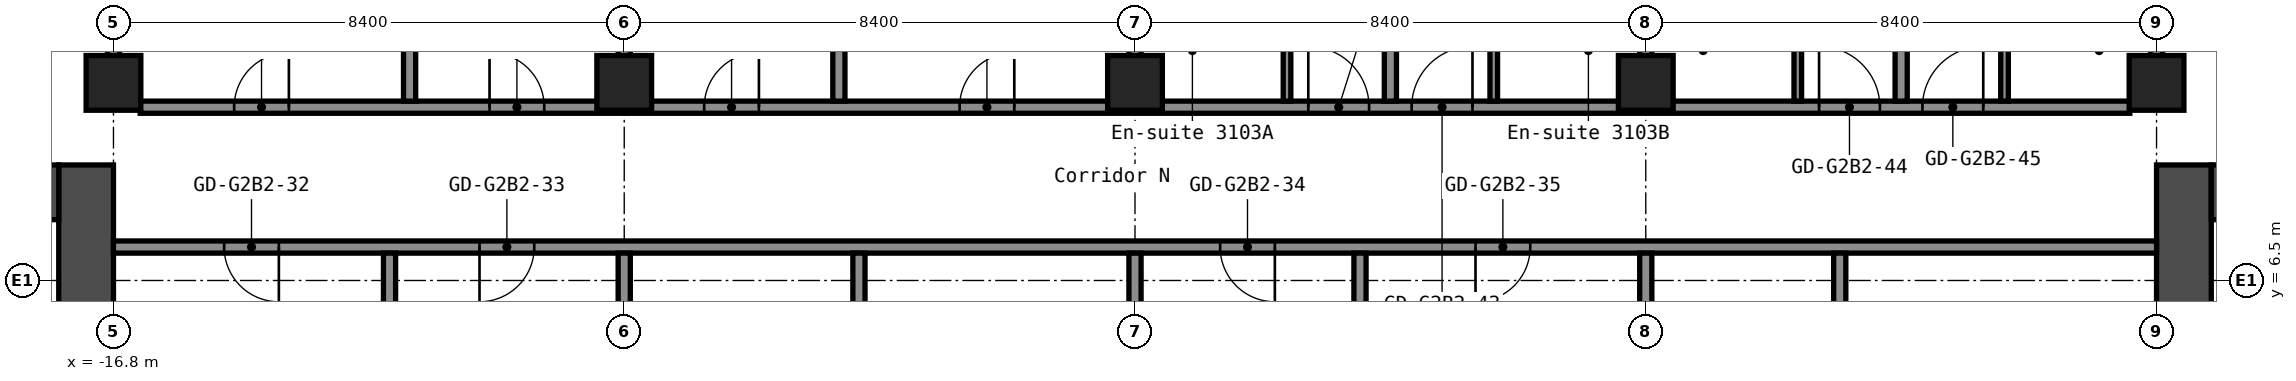
"""IFC4 building model, lengths in metres.
Left out: names, types, materials, properties, quantities, classifications, styles, units other than length and angle.
Written with IfcOpenShell. Run it as: python <this file> out.ifc"""

import sys

from ifc_helpers import new_model, si_unit, direction, frame, frame_2d, origin, origin_2d, place, context, subcontext, project, spatial, rectangle, hollow_rectangle, extrude, element, fill, save


model = new_model("IFC4")
c1 = context("Model", 3, precision=1e-05, world=origin(), true_north=direction((0.0, 1.0)))
c2 = subcontext(c1, "Body", "Model", "MODEL_VIEW")
j1 = project(units=[si_unit("LENGTHUNIT", "METRE"), si_unit("PLANEANGLEUNIT", "RADIAN")], contexts=[c1])
p1 = place(None, origin())
s1 = spatial("IfcSite", under=j1, at=p1, CompositionType="ELEMENT")
p2 = place(p1, origin())
s2 = spatial("IfcBuilding", under=s1, at=p2, CompositionType="ELEMENT")
p3 = place(p2, frame((0.0, 0.0, 110.6)))
s3 = spatial("IfcBuildingStorey", under=s2, at=p3, CompositionType="ELEMENT", Elevation=110.6)
for number, where, z_axis, x_axis in (
    (1, (-16.8, 9.75, 0.0), (0.0, 0.0, 1.0), (1.0, 0.0, 0.0)),
    (2, (-8.4, 9.75, 0.0), (0.0, 0.0, 1.0), (1.0, 0.0, 0.0)),
    (3, (0.0, 9.75, 0.0), (0.0, 0.0, 1.0), (1.0, 0.0, 0.0)),
    (4, (8.4, 9.75, 0.0), (0.0, 0.0, 1.0), (1.0, 0.0, 0.0)),
    (5, (16.8, 9.75, 0.0), (0.0, 0.0, 1.0), (1.0, 0.0, 0.0)),
):
    element("IfcColumn", number, at=place(p3, frame(where, z_axis=z_axis, x_axis=x_axis)), inside=s3, PredefinedType="COLUMN", context=c2, shape_type="SweptSolid", body=[
        extrude(hollow_rectangle(XDim=0.9, YDim=0.9, WallThickness=0.036, at=origin_2d()), origin(), (0.0, 0.0, 1.0), 2.8),
    ])
p4 = place(p3, frame((-17.25, -8.4, 0.0), z_axis=(0.0, 0.0, 1.0), x_axis=(0.0, 1.0, 0.0)))
e6 = element("IfcWall", 6, at=p4, inside=s3, PredefinedType="SHEAR", context=c2, shape_type="SweptSolid", body=[
    extrude(rectangle(XDim=16.8, YDim=0.9, at=frame_2d((8.4, 0.0))), origin(), (0.0, 0.0, 1.0), 2.8),
])
p5 = place(p4, frame((7.6, 0.0, 0.0)))
e7 = element("IfcOpeningElement", 7, at=p5, cuts=e6, PredefinedType="OPENING", context=c2, shape_type="SweptSolid", body=[
    extrude(rectangle(XDim=1.2, YDim=2.1, at=frame_2d((0.6, 1.05))), frame((0.0, 0.46, 0.0), z_axis=(0.0, -1.0, 0.0), x_axis=(1.0, 0.0, 0.0)), (0.0, 0.0, 1.0), 0.92),
])
p6 = place(p3, frame((-32.7, 7.95, 0.0), z_axis=(0.0, 0.0, 1.0), x_axis=(1.0, 0.0, 0.0)))
e8 = element("IfcWall", 8, at=p6, inside=s3, PredefinedType="SHEAR", context=c2, shape_type="SweptSolid", body=[
    extrude(rectangle(XDim=15.0, YDim=0.9, at=frame_2d((7.5, 0.0))), origin(), (0.0, 0.0, 1.0), 2.8),
])
p7 = place(p6, frame((3.4, 0.0, 0.0)))
e9 = element("IfcOpeningElement", 9, at=p7, cuts=e8, PredefinedType="OPENING", context=c2, shape_type="SweptSolid", body=[
    extrude(rectangle(XDim=1.2, YDim=2.1, at=frame_2d((0.6, 1.05))), frame((0.0, 0.46, 0.0), z_axis=(0.0, -1.0, 0.0), x_axis=(1.0, 0.0, 0.0)), (0.0, 0.0, 1.0), 0.92),
])
p8 = place(p6, frame((0.75, 0.0, 0.0)))
e10 = element("IfcOpeningElement", 10, at=p8, cuts=e8, PredefinedType="OPENING", context=c2, shape_type="SweptSolid", body=[
    extrude(rectangle(XDim=0.9, YDim=2.1, at=frame_2d((0.45, 1.05))), frame((0.0, 0.46, 0.0), z_axis=(0.0, -1.0, 0.0), x_axis=(1.0, 0.0, 0.0)), (0.0, 0.0, 1.0), 0.92),
])
p9 = place(p3, frame((17.25, -8.4, 0.0), z_axis=(0.0, 0.0, 1.0), x_axis=(0.0, 1.0, 0.0)))
e11 = element("IfcWall", 11, at=p9, inside=s3, PredefinedType="SHEAR", context=c2, shape_type="SweptSolid", body=[
    extrude(rectangle(XDim=16.8, YDim=0.9, at=frame_2d((8.4, 0.0))), origin(), (0.0, 0.0, 1.0), 2.8),
])
p10 = place(p9, frame((7.6, 0.0, 0.0)))
e12 = element("IfcOpeningElement", 12, at=p10, cuts=e11, PredefinedType="OPENING", context=c2, shape_type="SweptSolid", body=[
    extrude(rectangle(XDim=1.2, YDim=2.1, at=frame_2d((0.6, 1.05))), frame((0.0, 0.46, 0.0), z_axis=(0.0, -1.0, 0.0), x_axis=(1.0, 0.0, 0.0)), (0.0, 0.0, 1.0), 0.92),
])
p11 = place(p3, frame((17.7, 7.95, 0.0), z_axis=(0.0, 0.0, 1.0), x_axis=(1.0, 0.0, 0.0)))
e13 = element("IfcWall", 13, at=p11, inside=s3, PredefinedType="SHEAR", context=c2, shape_type="SweptSolid", body=[
    extrude(rectangle(XDim=15.0, YDim=0.9, at=frame_2d((7.5, 0.0))), origin(), (0.0, 0.0, 1.0), 2.8),
])
p12 = place(p11, frame((10.4, 0.0, 0.0)))
e14 = element("IfcOpeningElement", 14, at=p12, cuts=e13, PredefinedType="OPENING", context=c2, shape_type="SweptSolid", body=[
    extrude(rectangle(XDim=1.2, YDim=2.1, at=frame_2d((0.6, 1.05))), frame((0.0, 0.46, 0.0), z_axis=(0.0, -1.0, 0.0), x_axis=(1.0, 0.0, 0.0)), (0.0, 0.0, 1.0), 0.92),
])
p13 = place(p11, frame((13.35, 0.0, 0.0)))
e15 = element("IfcOpeningElement", 15, at=p13, cuts=e13, PredefinedType="OPENING", context=c2, shape_type="SweptSolid", body=[
    extrude(rectangle(XDim=0.9, YDim=2.1, at=frame_2d((0.45, 1.05))), frame((0.0, 0.46, 0.0), z_axis=(0.0, -1.0, 0.0), x_axis=(1.0, 0.0, 0.0)), (0.0, 0.0, 1.0), 0.92),
])
p14 = place(p3, frame((-16.8, 7.05, 0.0), z_axis=(0.0, 0.0, 1.0), x_axis=(1.0, 0.0, 0.0)))
e16 = element("IfcWall", 16, at=p14, inside=s3, PredefinedType="PARTITIONING", context=c2, shape_type="SweptSolid", body=[
    extrude(rectangle(XDim=33.6, YDim=0.2, at=frame_2d((16.8, 0.0))), origin(), (0.0, 0.0, 1.0), 2.8),
])
p15 = place(p14, frame((1.82, 0.0, 0.0)))
e17 = element("IfcOpeningElement", 17, at=p15, cuts=e16, PredefinedType="OPENING", context=c2, shape_type="SweptSolid", body=[
    extrude(rectangle(XDim=0.9, YDim=2.1, at=frame_2d((0.45, 1.05))), frame((0.0, 0.11, 0.0), z_axis=(0.0, -1.0, 0.0), x_axis=(1.0, 0.0, 0.0)), (0.0, 0.0, 1.0), 0.22),
])
p16 = place(p14, frame((6.02, 0.0, 0.0)))
e18 = element("IfcOpeningElement", 18, at=p16, cuts=e16, PredefinedType="OPENING", context=c2, shape_type="SweptSolid", body=[
    extrude(rectangle(XDim=0.9, YDim=2.1, at=frame_2d((0.45, 1.05))), frame((0.0, 0.11, 0.0), z_axis=(0.0, -1.0, 0.0), x_axis=(1.0, 0.0, 0.0)), (0.0, 0.0, 1.0), 0.22),
])
p17 = place(p14, frame((18.2, 0.0, 0.0)))
e19 = element("IfcOpeningElement", 19, at=p17, cuts=e16, PredefinedType="OPENING", context=c2, shape_type="SweptSolid", body=[
    extrude(rectangle(XDim=0.9, YDim=2.1, at=frame_2d((0.45, 1.05))), frame((0.0, 0.11, 0.0), z_axis=(0.0, -1.0, 0.0), x_axis=(1.0, 0.0, 0.0)), (0.0, 0.0, 1.0), 0.22),
])
p18 = place(p14, frame((22.4, 0.0, 0.0)))
e20 = element("IfcOpeningElement", 20, at=p18, cuts=e16, PredefinedType="OPENING", context=c2, shape_type="SweptSolid", body=[
    extrude(rectangle(XDim=0.9, YDim=2.1, at=frame_2d((0.45, 1.05))), frame((0.0, 0.11, 0.0), z_axis=(0.0, -1.0, 0.0), x_axis=(1.0, 0.0, 0.0)), (0.0, 0.0, 1.0), 0.22),
])
p19 = place(p3, frame((-16.36, 9.35, 0.0), z_axis=(0.0, 0.0, 1.0), x_axis=(1.0, 0.0, 0.0)))
e21 = element("IfcWall", 21, at=p19, inside=s3, PredefinedType="PARTITIONING", context=c2, shape_type="SweptSolid", body=[
    extrude(rectangle(XDim=32.72, YDim=0.2, at=frame_2d((16.36, 0.0))), origin(), (0.0, 0.0, 1.0), 2.8),
])
p20 = place(p19, frame((1.545, 0.0, 0.0)))
e22 = element("IfcOpeningElement", 22, at=p20, cuts=e21, PredefinedType="OPENING", context=c2, shape_type="SweptSolid", body=[
    extrude(rectangle(XDim=0.9, YDim=2.1, at=frame_2d((0.45, 1.05))), frame((0.0, 0.11, 0.0), z_axis=(0.0, -1.0, 0.0), x_axis=(1.0, 0.0, 0.0)), (0.0, 0.0, 1.0), 0.22),
])
p21 = place(p19, frame((5.745, 0.0, 0.0)))
e23 = element("IfcOpeningElement", 23, at=p21, cuts=e21, PredefinedType="OPENING", context=c2, shape_type="SweptSolid", body=[
    extrude(rectangle(XDim=0.9, YDim=2.1, at=frame_2d((0.45, 1.05))), frame((0.0, 0.11, 0.0), z_axis=(0.0, -1.0, 0.0), x_axis=(1.0, 0.0, 0.0)), (0.0, 0.0, 1.0), 0.22),
])
p22 = place(p19, frame((9.275, 0.0, 0.0)))
e24 = element("IfcOpeningElement", 24, at=p22, cuts=e21, PredefinedType="OPENING", context=c2, shape_type="SweptSolid", body=[
    extrude(rectangle(XDim=0.9, YDim=2.1, at=frame_2d((0.45, 1.05))), frame((0.0, 0.11, 0.0), z_axis=(0.0, -1.0, 0.0), x_axis=(1.0, 0.0, 0.0)), (0.0, 0.0, 1.0), 0.22),
])
p23 = place(p19, frame((13.475, 0.0, 0.0)))
e25 = element("IfcOpeningElement", 25, at=p23, cuts=e21, PredefinedType="OPENING", context=c2, shape_type="SweptSolid", body=[
    extrude(rectangle(XDim=0.9, YDim=2.1, at=frame_2d((0.45, 1.05))), frame((0.0, 0.11, 0.0), z_axis=(0.0, -1.0, 0.0), x_axis=(1.0, 0.0, 0.0)), (0.0, 0.0, 1.0), 0.22),
])
p24 = place(p19, frame((19.21, 0.0, 0.0)))
e26 = element("IfcOpeningElement", 26, at=p24, cuts=e21, PredefinedType="OPENING", context=c2, shape_type="SweptSolid", body=[
    extrude(rectangle(XDim=1.0, YDim=2.1, at=frame_2d((0.5, 1.05))), frame((0.0, 0.11, 0.0), z_axis=(0.0, -1.0, 0.0), x_axis=(1.0, 0.0, 0.0)), (0.0, 0.0, 1.0), 0.22),
])
p25 = place(p19, frame((20.91, 0.0, 0.0)))
e27 = element("IfcOpeningElement", 27, at=p25, cuts=e21, PredefinedType="OPENING", context=c2, shape_type="SweptSolid", body=[
    extrude(rectangle(XDim=1.0, YDim=2.1, at=frame_2d((0.5, 1.05))), frame((0.0, 0.11, 0.0), z_axis=(0.0, -1.0, 0.0), x_axis=(1.0, 0.0, 0.0)), (0.0, 0.0, 1.0), 0.22),
])
p26 = place(p19, frame((27.61, 0.0, 0.0)))
e28 = element("IfcOpeningElement", 28, at=p26, cuts=e21, PredefinedType="OPENING", context=c2, shape_type="SweptSolid", body=[
    extrude(rectangle(XDim=1.0, YDim=2.1, at=frame_2d((0.5, 1.05))), frame((0.0, 0.11, 0.0), z_axis=(0.0, -1.0, 0.0), x_axis=(1.0, 0.0, 0.0)), (0.0, 0.0, 1.0), 0.22),
])
p27 = place(p19, frame((29.31, 0.0, 0.0)))
e29 = element("IfcOpeningElement", 29, at=p27, cuts=e21, PredefinedType="OPENING", context=c2, shape_type="SweptSolid", body=[
    extrude(rectangle(XDim=1.0, YDim=2.1, at=frame_2d((0.5, 1.05))), frame((0.0, 0.11, 0.0), z_axis=(0.0, -1.0, 0.0), x_axis=(1.0, 0.0, 0.0)), (0.0, 0.0, 1.0), 0.22),
])
p28 = place(p3, frame((-16.8, 10.19, 0.0), z_axis=(0.0, 0.0, 1.0), x_axis=(0.0, 1.0, 0.0)))
e30 = element("IfcWall", 30, at=p28, inside=s3, PredefinedType="PARTITIONING", context=c2, shape_type="SweptSolid", body=[
    extrude(rectangle(XDim=13.36, YDim=0.2, at=frame_2d((6.68, 0.0))), origin(), (0.0, 0.0, 1.0), 2.8),
])
p29 = place(p3, frame((-12.26, 1.05, 0.0), z_axis=(0.0, 0.0, 1.0), x_axis=(0.0, 1.0, 0.0)))
e31 = element("IfcWall", 31, at=p29, inside=s3, PredefinedType="PARTITIONING", context=c2, shape_type="SweptSolid", body=[
    extrude(rectangle(XDim=5.9, YDim=0.2, at=frame_2d((2.95, 0.0))), origin(), (0.0, 0.0, 1.0), 2.8),
])
p30 = place(p3, frame((-11.93, 9.45, 0.0), z_axis=(0.0, 0.0, 1.0), x_axis=(0.0, 1.0, 0.0)))
e32 = element("IfcWall", 32, at=p30, inside=s3, PredefinedType="PARTITIONING", context=c2, shape_type="SweptSolid", body=[
    extrude(rectangle(XDim=14.1, YDim=0.2, at=frame_2d((7.05, 0.0))), origin(), (0.0, 0.0, 1.0), 2.8),
])
p31 = place(p3, frame((-8.4, 1.05, 0.0), z_axis=(0.0, 0.0, 1.0), x_axis=(0.0, 1.0, 0.0)))
e33 = element("IfcWall", 33, at=p31, inside=s3, PredefinedType="PARTITIONING", context=c2, shape_type="SweptSolid", body=[
    extrude(rectangle(XDim=5.9, YDim=0.2, at=frame_2d((2.95, 0.0))), origin(), (0.0, 0.0, 1.0), 2.8),
])
p32 = place(p3, frame((-8.4, 10.19, 0.0), z_axis=(0.0, 0.0, 1.0), x_axis=(0.0, 1.0, 0.0)))
e34 = element("IfcWall", 34, at=p32, inside=s3, PredefinedType="PARTITIONING", context=c2, shape_type="SweptSolid", body=[
    extrude(rectangle(XDim=13.36, YDim=0.2, at=frame_2d((6.68, 0.0))), origin(), (0.0, 0.0, 1.0), 2.8),
])
p33 = place(p3, frame((-4.87, 9.45, 0.0), z_axis=(0.0, 0.0, 1.0), x_axis=(0.0, 1.0, 0.0)))
e35 = element("IfcWall", 35, at=p33, inside=s3, PredefinedType="PARTITIONING", context=c2, shape_type="SweptSolid", body=[
    extrude(rectangle(XDim=14.1, YDim=0.2, at=frame_2d((7.05, 0.0))), origin(), (0.0, 0.0, 1.0), 2.8),
])
for number, where, z_axis, x_axis in (
    (36, (-4.54, 1.05, 0.0), (0.0, 0.0, 1.0), (0.0, 1.0, 0.0)),
    (37, (0.0, 1.05, 0.0), (0.0, 0.0, 1.0), (0.0, 1.0, 0.0)),
):
    element("IfcWall", number, at=place(p3, frame(where, z_axis=z_axis, x_axis=x_axis)), inside=s3, PredefinedType="PARTITIONING", context=c2, shape_type="SweptSolid", body=[
        extrude(rectangle(XDim=5.9, YDim=0.2, at=frame_2d((2.95, 0.0))), origin(), (0.0, 0.0, 1.0), 2.8),
    ])
p34 = place(p3, frame((0.0, 10.19, 0.0), z_axis=(0.0, 0.0, 1.0), x_axis=(0.0, 1.0, 0.0)))
e38 = element("IfcWall", 38, at=p34, inside=s3, PredefinedType="PARTITIONING", context=c2, shape_type="SweptSolid", body=[
    extrude(rectangle(XDim=13.36, YDim=0.2, at=frame_2d((6.68, 0.0))), origin(), (0.0, 0.0, 1.0), 2.8),
])
p35 = place(p3, frame((2.5, 9.45, 0.0), z_axis=(0.0, 0.0, 1.0), x_axis=(0.0, 1.0, 0.0)))
e39 = element("IfcWall", 39, at=p35, inside=s3, PredefinedType="PARTITIONING", context=c2, shape_type="SweptSolid", body=[
    extrude(rectangle(XDim=2.9, YDim=0.125, at=frame_2d((1.45, 0.0))), origin(), (0.0, 0.0, 1.0), 2.8),
])
p36 = place(p35, frame((1.5, 0.0, 0.0)))
e40 = element("IfcOpeningElement", 40, at=p36, cuts=e39, PredefinedType="OPENING", context=c2, shape_type="SweptSolid", body=[
    extrude(rectangle(XDim=0.8, YDim=2.1, at=frame_2d((0.4, 1.05))), frame((0.0, 0.073, 0.0), z_axis=(0.0, -1.0, 0.0), x_axis=(1.0, 0.0, 0.0)), (0.0, 0.0, 1.0), 0.145),
])
p37 = place(p3, frame((3.7, 1.05, 0.0), z_axis=(0.0, 0.0, 1.0), x_axis=(0.0, 1.0, 0.0)))
e41 = element("IfcWall", 41, at=p37, inside=s3, PredefinedType="PARTITIONING", context=c2, shape_type="SweptSolid", body=[
    extrude(rectangle(XDim=5.9, YDim=0.2, at=frame_2d((2.95, 0.0))), origin(), (0.0, 0.0, 1.0), 2.8),
])
p38 = place(p3, frame((4.2, 9.45, 0.0), z_axis=(0.0, 0.0, 1.0), x_axis=(0.0, 1.0, 0.0)))
e42 = element("IfcWall", 42, at=p38, inside=s3, PredefinedType="PARTITIONING", context=c2, shape_type="SweptSolid", body=[
    extrude(rectangle(XDim=14.1, YDim=0.2, at=frame_2d((7.05, 0.0))), origin(), (0.0, 0.0, 1.0), 2.8),
])
p39 = place(p3, frame((5.9, 9.45, 0.0), z_axis=(0.0, 0.0, 1.0), x_axis=(0.0, 1.0, 0.0)))
e43 = element("IfcWall", 43, at=p39, inside=s3, PredefinedType="PARTITIONING", context=c2, shape_type="SweptSolid", body=[
    extrude(rectangle(XDim=2.9, YDim=0.125, at=frame_2d((1.45, 0.0))), origin(), (0.0, 0.0, 1.0), 2.8),
])
p40 = place(p39, frame((1.5, 0.0, 0.0)))
e44 = element("IfcOpeningElement", 44, at=p40, cuts=e43, PredefinedType="OPENING", context=c2, shape_type="SweptSolid", body=[
    extrude(rectangle(XDim=0.8, YDim=2.1, at=frame_2d((0.4, 1.05))), frame((0.0, 0.073, 0.0), z_axis=(0.0, -1.0, 0.0), x_axis=(1.0, 0.0, 0.0)), (0.0, 0.0, 1.0), 0.145),
])
p41 = place(p3, frame((8.4, 1.05, 0.0), z_axis=(0.0, 0.0, 1.0), x_axis=(0.0, 1.0, 0.0)))
e45 = element("IfcWall", 45, at=p41, inside=s3, PredefinedType="PARTITIONING", context=c2, shape_type="SweptSolid", body=[
    extrude(rectangle(XDim=5.9, YDim=0.2, at=frame_2d((2.95, 0.0))), origin(), (0.0, 0.0, 1.0), 2.8),
])
p42 = place(p3, frame((8.4, 10.19, 0.0), z_axis=(0.0, 0.0, 1.0), x_axis=(0.0, 1.0, 0.0)))
e46 = element("IfcWall", 46, at=p42, inside=s3, PredefinedType="PARTITIONING", context=c2, shape_type="SweptSolid", body=[
    extrude(rectangle(XDim=13.36, YDim=0.2, at=frame_2d((6.68, 0.0))), origin(), (0.0, 0.0, 1.0), 2.8),
])
p43 = place(p3, frame((10.9, 9.45, 0.0), z_axis=(0.0, 0.0, 1.0), x_axis=(0.0, 1.0, 0.0)))
e47 = element("IfcWall", 47, at=p43, inside=s3, PredefinedType="PARTITIONING", context=c2, shape_type="SweptSolid", body=[
    extrude(rectangle(XDim=2.9, YDim=0.125, at=frame_2d((1.45, 0.0))), origin(), (0.0, 0.0, 1.0), 2.8),
])
p44 = place(p43, frame((1.5, 0.0, 0.0)))
e48 = element("IfcOpeningElement", 48, at=p44, cuts=e47, PredefinedType="OPENING", context=c2, shape_type="SweptSolid", body=[
    extrude(rectangle(XDim=0.8, YDim=2.1, at=frame_2d((0.4, 1.05))), frame((0.0, 0.073, 0.0), z_axis=(0.0, -1.0, 0.0), x_axis=(1.0, 0.0, 0.0)), (0.0, 0.0, 1.0), 0.145),
])
p45 = place(p3, frame((11.59, 1.05, 0.0), z_axis=(0.0, 0.0, 1.0), x_axis=(0.0, 1.0, 0.0)))
e49 = element("IfcWall", 49, at=p45, inside=s3, PredefinedType="PARTITIONING", context=c2, shape_type="SweptSolid", body=[
    extrude(rectangle(XDim=5.9, YDim=0.2, at=frame_2d((2.95, 0.0))), origin(), (0.0, 0.0, 1.0), 2.8),
])
p46 = place(p3, frame((12.6, 9.45, 0.0), z_axis=(0.0, 0.0, 1.0), x_axis=(0.0, 1.0, 0.0)))
e50 = element("IfcWall", 50, at=p46, inside=s3, PredefinedType="PARTITIONING", context=c2, shape_type="SweptSolid", body=[
    extrude(rectangle(XDim=14.1, YDim=0.2, at=frame_2d((7.05, 0.0))), origin(), (0.0, 0.0, 1.0), 2.8),
])
p47 = place(p3, frame((14.3, 9.45, 0.0), z_axis=(0.0, 0.0, 1.0), x_axis=(0.0, 1.0, 0.0)))
e51 = element("IfcWall", 51, at=p47, inside=s3, PredefinedType="PARTITIONING", context=c2, shape_type="SweptSolid", body=[
    extrude(rectangle(XDim=2.9, YDim=0.125, at=frame_2d((1.45, 0.0))), origin(), (0.0, 0.0, 1.0), 2.8),
])
p48 = place(p47, frame((1.5, 0.0, 0.0)))
e52 = element("IfcOpeningElement", 52, at=p48, cuts=e51, PredefinedType="OPENING", context=c2, shape_type="SweptSolid", body=[
    extrude(rectangle(XDim=0.8, YDim=2.1, at=frame_2d((0.4, 1.05))), frame((0.0, 0.073, 0.0), z_axis=(0.0, -1.0, 0.0), x_axis=(1.0, 0.0, 0.0)), (0.0, 0.0, 1.0), 0.145),
])
p49 = place(p3, frame((16.8, 10.19, 0.0), z_axis=(0.0, 0.0, 1.0), x_axis=(0.0, 1.0, 0.0)))
e53 = element("IfcWall", 53, at=p49, inside=s3, PredefinedType="PARTITIONING", context=c2, shape_type="SweptSolid", body=[
    extrude(rectangle(XDim=13.36, YDim=0.2, at=frame_2d((6.68, 0.0))), origin(), (0.0, 0.0, 1.0), 2.8),
])
p50 = place(p15, origin())
e54 = element("IfcDoor", 54, at=p50, inside=s3, OperationType="SINGLE_SWING_RIGHT", PredefinedType="DOOR", context=c2, shape_type="SweptSolid", body=[
    extrude(rectangle(XDim=0.9, YDim=2.1, at=frame_2d((0.45, 1.05))), frame((0.0, 0.025, 0.0), z_axis=(0.0, -1.0, 0.0), x_axis=(1.0, 0.0, 0.0)), (0.0, 0.0, 1.0), 0.05),
])
fill(e17, e54)
p51 = place(p16, origin())
e55 = element("IfcDoor", 55, at=p51, inside=s3, OperationType="SINGLE_SWING_LEFT", PredefinedType="DOOR", context=c2, shape_type="SweptSolid", body=[
    extrude(rectangle(XDim=0.9, YDim=2.1, at=frame_2d((0.45, 1.05))), frame((0.0, 0.025, 0.0), z_axis=(0.0, -1.0, 0.0), x_axis=(1.0, 0.0, 0.0)), (0.0, 0.0, 1.0), 0.05),
])
fill(e18, e55)
p52 = place(p17, origin())
e56 = element("IfcDoor", 56, at=p52, inside=s3, OperationType="SINGLE_SWING_RIGHT", PredefinedType="DOOR", context=c2, shape_type="SweptSolid", body=[
    extrude(rectangle(XDim=0.9, YDim=2.1, at=frame_2d((0.45, 1.05))), frame((0.0, 0.025, 0.0), z_axis=(0.0, -1.0, 0.0), x_axis=(1.0, 0.0, 0.0)), (0.0, 0.0, 1.0), 0.05),
])
fill(e19, e56)
p53 = place(p18, origin())
e57 = element("IfcDoor", 57, at=p53, inside=s3, OperationType="SINGLE_SWING_LEFT", PredefinedType="DOOR", context=c2, shape_type="SweptSolid", body=[
    extrude(rectangle(XDim=0.9, YDim=2.1, at=frame_2d((0.45, 1.05))), frame((0.0, 0.025, 0.0), z_axis=(0.0, -1.0, 0.0), x_axis=(1.0, 0.0, 0.0)), (0.0, 0.0, 1.0), 0.05),
])
fill(e20, e57)
p54 = place(p20, origin())
e58 = element("IfcDoor", 58, at=p54, inside=s3, OperationType="SINGLE_SWING_LEFT", PredefinedType="DOOR", context=c2, shape_type="SweptSolid", body=[
    extrude(rectangle(XDim=0.9, YDim=2.1, at=frame_2d((0.45, 1.05))), frame((0.0, 0.025, 0.0), z_axis=(0.0, -1.0, 0.0), x_axis=(1.0, 0.0, 0.0)), (0.0, 0.0, 1.0), 0.05),
])
fill(e22, e58)
p55 = place(p21, origin())
e59 = element("IfcDoor", 59, at=p55, inside=s3, OperationType="SINGLE_SWING_RIGHT", PredefinedType="DOOR", context=c2, shape_type="SweptSolid", body=[
    extrude(rectangle(XDim=0.9, YDim=2.1, at=frame_2d((0.45, 1.05))), frame((0.0, 0.025, 0.0), z_axis=(0.0, -1.0, 0.0), x_axis=(1.0, 0.0, 0.0)), (0.0, 0.0, 1.0), 0.05),
])
fill(e23, e59)
p56 = place(p22, origin())
e60 = element("IfcDoor", 60, at=p56, inside=s3, OperationType="SINGLE_SWING_LEFT", PredefinedType="DOOR", context=c2, shape_type="SweptSolid", body=[
    extrude(rectangle(XDim=0.9, YDim=2.1, at=frame_2d((0.45, 1.05))), frame((0.0, 0.025, 0.0), z_axis=(0.0, -1.0, 0.0), x_axis=(1.0, 0.0, 0.0)), (0.0, 0.0, 1.0), 0.05),
])
fill(e24, e60)
p57 = place(p23, origin())
e61 = element("IfcDoor", 61, at=p57, inside=s3, OperationType="SINGLE_SWING_LEFT", PredefinedType="DOOR", context=c2, shape_type="SweptSolid", body=[
    extrude(rectangle(XDim=0.9, YDim=2.1, at=frame_2d((0.45, 1.05))), frame((0.0, 0.025, 0.0), z_axis=(0.0, -1.0, 0.0), x_axis=(1.0, 0.0, 0.0)), (0.0, 0.0, 1.0), 0.05),
])
fill(e25, e61)
p58 = place(p24, origin())
e62 = element("IfcDoor", 62, at=p58, inside=s3, OperationType="SINGLE_SWING_RIGHT", PredefinedType="DOOR", context=c2, shape_type="SweptSolid", body=[
    extrude(rectangle(XDim=1.0, YDim=2.1, at=frame_2d((0.5, 1.05))), frame((0.0, 0.025, 0.0), z_axis=(0.0, -1.0, 0.0), x_axis=(1.0, 0.0, 0.0)), (0.0, 0.0, 1.0), 0.05),
])
fill(e26, e62)
p59 = place(p25, origin())
e63 = element("IfcDoor", 63, at=p59, inside=s3, OperationType="SINGLE_SWING_LEFT", PredefinedType="DOOR", context=c2, shape_type="SweptSolid", body=[
    extrude(rectangle(XDim=1.0, YDim=2.1, at=frame_2d((0.5, 1.05))), frame((0.0, 0.025, 0.0), z_axis=(0.0, -1.0, 0.0), x_axis=(1.0, 0.0, 0.0)), (0.0, 0.0, 1.0), 0.05),
])
fill(e27, e63)
p60 = place(p26, origin())
e64 = element("IfcDoor", 64, at=p60, inside=s3, OperationType="SINGLE_SWING_RIGHT", PredefinedType="DOOR", context=c2, shape_type="SweptSolid", body=[
    extrude(rectangle(XDim=1.0, YDim=2.1, at=frame_2d((0.5, 1.05))), frame((0.0, 0.025, 0.0), z_axis=(0.0, -1.0, 0.0), x_axis=(1.0, 0.0, 0.0)), (0.0, 0.0, 1.0), 0.05),
])
fill(e28, e64)
p61 = place(p27, origin())
e65 = element("IfcDoor", 65, at=p61, inside=s3, OperationType="SINGLE_SWING_LEFT", PredefinedType="DOOR", context=c2, shape_type="SweptSolid", body=[
    extrude(rectangle(XDim=1.0, YDim=2.1, at=frame_2d((0.5, 1.05))), frame((0.0, 0.025, 0.0), z_axis=(0.0, -1.0, 0.0), x_axis=(1.0, 0.0, 0.0)), (0.0, 0.0, 1.0), 0.05),
])
fill(e29, e65)
save(model, sys.argv[1])
